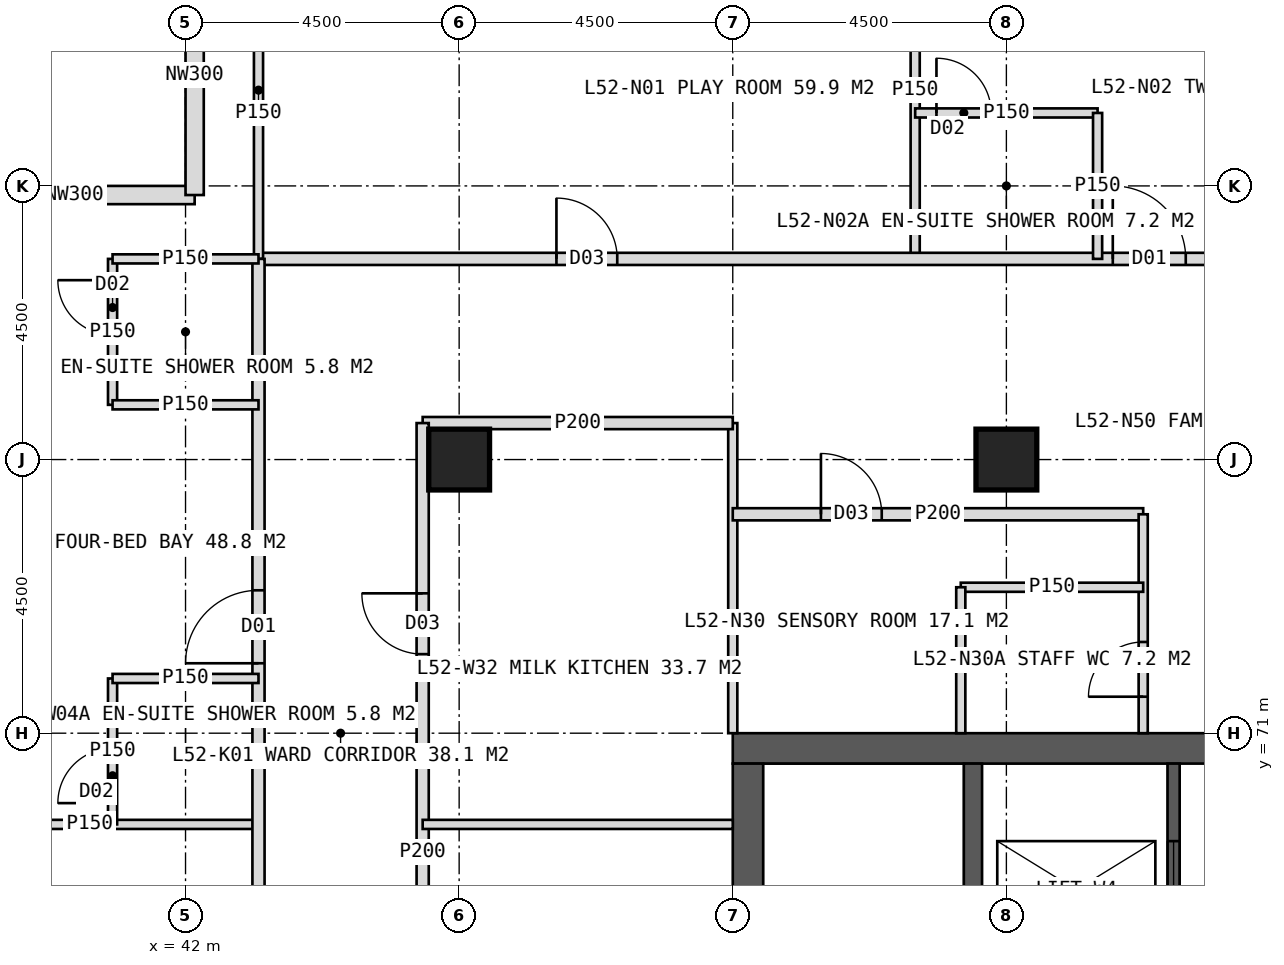
"""IFC4 building model, lengths in metres.
Left out: names, types, materials, properties, quantities, classifications, styles, units other than length and angle.
Written with IfcOpenShell. Run it as: python <this file> out.ifc"""

import sys

from ifc_helpers import new_model, si_unit, direction, frame, frame_2d, origin, origin_2d, place, context, subcontext, project, spatial, rectangle, hollow_rectangle, extrude, element, fill, save


model = new_model("IFC4")
c1 = context("Model", 3, precision=1e-05, world=origin(), true_north=direction((0.0, 1.0)))
c2 = subcontext(c1, "Body", "Model", "MODEL_VIEW")
j1 = project(units=[si_unit("LENGTHUNIT", "METRE"), si_unit("PLANEANGLEUNIT", "RADIAN")], contexts=[c1])
p1 = place(None, origin())
s1 = spatial("IfcSite", under=j1, at=p1, CompositionType="ELEMENT")
p2 = place(p1, origin())
s2 = spatial("IfcBuilding", under=s1, at=p2, CompositionType="ELEMENT")
p3 = place(p2, frame((0.0, 0.0, 217.0)))
s3 = spatial("IfcBuildingStorey", under=s2, at=p3, CompositionType="ELEMENT", Elevation=217.0)
p4 = place(p3, frame((51.0, 70.75, 0.0), z_axis=(0.0, 0.0, 1.0), x_axis=(1.0, 0.0, 0.0)))
e1 = element("IfcWall", 1, at=p4, inside=s3, PredefinedType="SHEAR", context=c2, shape_type="SweptSolid", body=[
    extrude(rectangle(XDim=18.0, YDim=0.5, at=frame_2d((9.0, 0.0))), origin(), (0.0, 0.0, 1.0), 4.0),
])
p5 = place(p4, frame((8.1, 0.0, 0.0)))
e2 = element("IfcOpeningElement", 2, at=p5, cuts=e1, PredefinedType="OPENING", context=c2, shape_type="SweptSolid", body=[
    extrude(rectangle(XDim=1.8, YDim=2.2, at=frame_2d((0.9, 1.1))), frame((0.0, 0.26, 0.0), z_axis=(0.0, -1.0, 0.0), x_axis=(1.0, 0.0, 0.0)), (0.0, 0.0, 1.0), 0.52),
])
p6 = place(p3, frame((51.25, 53.5, 0.0), z_axis=(0.0, 0.0, 1.0), x_axis=(0.0, 1.0, 0.0)))
e3 = element("IfcWall", 3, at=p6, inside=s3, PredefinedType="SHEAR", context=c2, shape_type="SweptSolid", body=[
    extrude(rectangle(XDim=17.0, YDim=0.5, at=frame_2d((8.5, 0.0))), origin(), (0.0, 0.0, 1.0), 4.0),
])
p7 = place(p6, frame((6.1, 0.0, 0.0)))
e4 = element("IfcOpeningElement", 4, at=p7, cuts=e3, PredefinedType="OPENING", context=c2, shape_type="SweptSolid", body=[
    extrude(rectangle(XDim=1.5, YDim=2.2, at=frame_2d((0.75, 1.1))), frame((0.0, 0.26, 0.0), z_axis=(0.0, -1.0, 0.0), x_axis=(1.0, 0.0, 0.0)), (0.0, 0.0, 1.0), 0.52),
])
p8 = place(p3, frame((54.95, 53.5, 0.0), z_axis=(0.0, 0.0, 1.0), x_axis=(0.0, 1.0, 0.0)))
e5 = element("IfcWall", 5, at=p8, inside=s3, PredefinedType="SHEAR", context=c2, shape_type="SweptSolid", body=[
    extrude(rectangle(XDim=17.0, YDim=0.3, at=frame_2d((8.5, 0.0))), origin(), (0.0, 0.0, 1.0), 4.0),
])
p9 = place(p3, frame((58.25, 53.5, 0.0), z_axis=(0.0, 0.0, 1.0), x_axis=(0.0, 1.0, 0.0)))
e6 = element("IfcWall", 6, at=p9, inside=s3, PredefinedType="SHEAR", context=c2, shape_type="SweptSolid", body=[
    extrude(rectangle(XDim=17.0, YDim=0.2, at=frame_2d((8.5, 0.0))), origin(), (0.0, 0.0, 1.0), 4.0),
])
p10 = place(p9, frame((0.393, 0.0, 0.0)))
e7 = element("IfcOpeningElement", 7, at=p10, cuts=e6, PredefinedType="OPENING", context=c2, shape_type="SweptSolid", body=[
    extrude(rectangle(XDim=1.0, YDim=2.1, at=frame_2d((0.5, 1.05))), frame((0.0, 0.11, 0.0), z_axis=(0.0, -1.0, 0.0), x_axis=(1.0, 0.0, 0.0)), (0.0, 0.0, 1.0), 0.22),
])
p11 = place(p9, frame((2.542, 0.0, 0.0)))
e8 = element("IfcOpeningElement", 8, at=p11, cuts=e6, PredefinedType="OPENING", context=c2, shape_type="SweptSolid", body=[
    extrude(rectangle(XDim=1.0, YDim=2.1, at=frame_2d((0.5, 1.05))), frame((0.0, 0.11, 0.0), z_axis=(0.0, -1.0, 0.0), x_axis=(1.0, 0.0, 0.0)), (0.0, 0.0, 1.0), 0.22),
])
p12 = place(p9, frame((5.127, 0.0, 0.0)))
e9 = element("IfcOpeningElement", 9, at=p12, cuts=e6, PredefinedType="OPENING", context=c2, shape_type="SweptSolid", body=[
    extrude(rectangle(XDim=1.0, YDim=2.1, at=frame_2d((0.5, 1.05))), frame((0.0, 0.11, 0.0), z_axis=(0.0, -1.0, 0.0), x_axis=(1.0, 0.0, 0.0)), (0.0, 0.0, 1.0), 0.22),
])
p13 = place(p9, frame((7.228, 0.0, 0.0)))
e10 = element("IfcOpeningElement", 10, at=p13, cuts=e6, PredefinedType="OPENING", context=c2, shape_type="SweptSolid", body=[
    extrude(rectangle(XDim=1.0, YDim=2.1, at=frame_2d((0.5, 1.05))), frame((0.0, 0.11, 0.0), z_axis=(0.0, -1.0, 0.0), x_axis=(1.0, 0.0, 0.0)), (0.0, 0.0, 1.0), 0.22),
])
p14 = place(p9, frame((10.025, 0.0, 0.0)))
e11 = element("IfcOpeningElement", 11, at=p14, cuts=e6, PredefinedType="OPENING", context=c2, shape_type="SweptSolid", body=[
    extrude(rectangle(XDim=1.4, YDim=2.2, at=frame_2d((0.7, 1.1))), frame((0.0, 0.11, 0.0), z_axis=(0.0, -1.0, 0.0), x_axis=(1.0, 0.0, 0.0)), (0.0, 0.0, 1.0), 0.22),
])
p15 = place(p9, frame((14.325, 0.0, 0.0)))
e12 = element("IfcOpeningElement", 12, at=p15, cuts=e6, PredefinedType="OPENING", context=c2, shape_type="SweptSolid", body=[
    extrude(rectangle(XDim=1.4, YDim=2.2, at=frame_2d((0.7, 1.1))), frame((0.0, 0.11, 0.0), z_axis=(0.0, -1.0, 0.0), x_axis=(1.0, 0.0, 0.0)), (0.0, 0.0, 1.0), 0.22),
])
for number, where, z_axis, x_axis in (
    (13, (46.5, 75.5, 0.0), (0.0, 0.0, 1.0), (1.0, 0.0, 0.0)),
    (14, (55.5, 75.5, 0.0), (0.0, 0.0, 1.0), (1.0, 0.0, 0.0)),
):
    element("IfcColumn", number, at=place(p3, frame(where, z_axis=z_axis, x_axis=x_axis)), inside=s3, PredefinedType="COLUMN", context=c2, shape_type="SweptSolid", body=[
        extrude(hollow_rectangle(XDim=1.0, YDim=1.0, WallThickness=0.1, at=origin_2d()), origin(), (0.0, 0.0, 1.0), 4.0),
    ])
for number, where, z_axis, x_axis in (
    (15, (38.2, 79.85, 0.0), (0.0, 0.0, 1.0), (1.0, 0.0, 0.0)),
    (16, (42.15, 79.85, 0.0), (0.0, 0.0, 1.0), (0.0, 1.0, 0.0)),
):
    element("IfcWall", number, at=place(p3, frame(where, z_axis=z_axis, x_axis=x_axis)), inside=s3, PredefinedType="ELEMENTEDWALL", context=c2, shape_type="SweptSolid", body=[
        extrude(rectangle(XDim=3.95, YDim=0.3, at=frame_2d((1.975, 0.0))), origin(), (0.0, 0.0, 1.0), 2.85),
    ])
p16 = place(p3, frame((54.0, 78.8, 0.0), z_axis=(0.0, 0.0, 1.0), x_axis=(0.0, 1.0, 0.0)))
e17 = element("IfcWall", 17, at=p16, inside=s3, PredefinedType="PARTITIONING", context=c2, shape_type="SweptSolid", body=[
    extrude(rectangle(XDim=5.55, YDim=0.15, at=frame_2d((2.775, 0.0))), origin(), (0.0, 0.0, 1.0), 3.75),
])
p17 = place(p3, frame((43.2, 78.8, 0.0), z_axis=(0.0, 0.0, 1.0), x_axis=(1.0, 0.0, 0.0)))
e18 = element("IfcWall", 18, at=p17, inside=s3, PredefinedType="PARTITIONING", context=c2, shape_type="SweptSolid", body=[
    extrude(rectangle(XDim=33.6, YDim=0.2, at=frame_2d((16.8, 0.0))), origin(), (0.0, 0.0, 1.0), 3.75),
])
p18 = place(p17, frame((4.9, 0.0, 0.0)))
e19 = element("IfcOpeningElement", 19, at=p18, cuts=e18, PredefinedType="OPENING", context=c2, shape_type="SweptSolid", body=[
    extrude(rectangle(XDim=1.0, YDim=2.1, at=frame_2d((0.5, 1.05))), frame((0.0, 0.11, 0.0), z_axis=(0.0, -1.0, 0.0), x_axis=(1.0, 0.0, 0.0)), (0.0, 0.0, 1.0), 0.22),
])
p19 = place(p17, frame((14.05, 0.0, 0.0)))
e20 = element("IfcOpeningElement", 20, at=p19, cuts=e18, PredefinedType="OPENING", context=c2, shape_type="SweptSolid", body=[
    extrude(rectangle(XDim=1.2, YDim=2.2, at=frame_2d((0.6, 1.1))), frame((0.0, 0.11, 0.0), z_axis=(0.0, -1.0, 0.0), x_axis=(1.0, 0.0, 0.0)), (0.0, 0.0, 1.0), 0.22),
])
p20 = place(p17, frame((22.45, 0.0, 0.0)))
e21 = element("IfcOpeningElement", 21, at=p20, cuts=e18, PredefinedType="OPENING", context=c2, shape_type="SweptSolid", body=[
    extrude(rectangle(XDim=1.2, YDim=2.2, at=frame_2d((0.6, 1.1))), frame((0.0, 0.11, 0.0), z_axis=(0.0, -1.0, 0.0), x_axis=(1.0, 0.0, 0.0)), (0.0, 0.0, 1.0), 0.22),
])
p21 = place(p3, frame((43.2, 78.8, 0.0), z_axis=(0.0, 0.0, 1.0), x_axis=(0.0, 1.0, 0.0)))
e22 = element("IfcWall", 22, at=p21, inside=s3, PredefinedType="PARTITIONING", context=c2, shape_type="SweptSolid", body=[
    extrude(rectangle(XDim=5.55, YDim=0.15, at=frame_2d((2.775, 0.0))), origin(), (0.0, 0.0, 1.0), 3.75),
])
p22 = place(p3, frame((54.0, 81.2, 0.0), z_axis=(0.0, 0.0, 1.0), x_axis=(1.0, 0.0, 0.0)))
e23 = element("IfcWall", 23, at=p22, inside=s3, PredefinedType="PARTITIONING", context=c2, shape_type="SweptSolid", body=[
    extrude(rectangle(XDim=3.0, YDim=0.15, at=frame_2d((1.5, 0.0))), origin(), (0.0, 0.0, 1.0), 3.75),
])
p23 = place(p22, frame((0.35, 0.0, 0.0)))
e24 = element("IfcOpeningElement", 24, at=p23, cuts=e23, PredefinedType="OPENING", context=c2, shape_type="SweptSolid", body=[
    extrude(rectangle(XDim=0.9, YDim=2.1, at=frame_2d((0.45, 1.05))), frame((0.0, 0.085, 0.0), z_axis=(0.0, -1.0, 0.0), x_axis=(1.0, 0.0, 0.0)), (0.0, 0.0, 1.0), 0.17),
])
p24 = place(p3, frame((57.0, 78.8, 0.0), z_axis=(0.0, 0.0, 1.0), x_axis=(0.0, 1.0, 0.0)))
e25 = element("IfcWall", 25, at=p24, inside=s3, PredefinedType="PARTITIONING", context=c2, shape_type="SweptSolid", body=[
    extrude(rectangle(XDim=2.4, YDim=0.15, at=frame_2d((1.2, 0.0))), origin(), (0.0, 0.0, 1.0), 3.75),
])
p25 = place(p3, frame((51.0, 71.0, 0.0), z_axis=(0.0, 0.0, 1.0), x_axis=(0.0, 1.0, 0.0)))
e26 = element("IfcWall", 26, at=p25, inside=s3, PredefinedType="PARTITIONING", context=c2, shape_type="SweptSolid", body=[
    extrude(rectangle(XDim=5.1, YDim=0.15, at=frame_2d((2.55, 0.0))), origin(), (0.0, 0.0, 1.0), 3.75),
])
p26 = place(p3, frame((45.9, 76.1, 0.0), z_axis=(0.0, 0.0, 1.0), x_axis=(1.0, 0.0, 0.0)))
e27 = element("IfcWall", 27, at=p26, inside=s3, PredefinedType="PARTITIONING", context=c2, shape_type="SweptSolid", body=[
    extrude(rectangle(XDim=5.1, YDim=0.2, at=frame_2d((2.55, 0.0))), origin(), (0.0, 0.0, 1.0), 3.75),
])
p27 = place(p3, frame((51.0, 74.6, 0.0), z_axis=(0.0, 0.0, 1.0), x_axis=(1.0, 0.0, 0.0)))
e28 = element("IfcWall", 28, at=p27, inside=s3, PredefinedType="PARTITIONING", context=c2, shape_type="SweptSolid", body=[
    extrude(rectangle(XDim=6.75, YDim=0.2, at=frame_2d((3.375, 0.0))), origin(), (0.0, 0.0, 1.0), 3.75),
])
p28 = place(p27, frame((1.45, 0.0, 0.0)))
e29 = element("IfcOpeningElement", 29, at=p28, cuts=e28, PredefinedType="OPENING", context=c2, shape_type="SweptSolid", body=[
    extrude(rectangle(XDim=1.0, YDim=2.1, at=frame_2d((0.5, 1.05))), frame((0.0, 0.11, 0.0), z_axis=(0.0, -1.0, 0.0), x_axis=(1.0, 0.0, 0.0)), (0.0, 0.0, 1.0), 0.22),
])
p29 = place(p3, frame((57.75, 71.0, 0.0), z_axis=(0.0, 0.0, 1.0), x_axis=(0.0, 1.0, 0.0)))
e30 = element("IfcWall", 30, at=p29, inside=s3, PredefinedType="PARTITIONING", context=c2, shape_type="SweptSolid", body=[
    extrude(rectangle(XDim=3.6, YDim=0.15, at=frame_2d((1.8, 0.0))), origin(), (0.0, 0.0, 1.0), 3.75),
])
p30 = place(p29, frame((0.6, 0.0, 0.0)))
e31 = element("IfcOpeningElement", 31, at=p30, cuts=e30, PredefinedType="OPENING", context=c2, shape_type="SweptSolid", body=[
    extrude(rectangle(XDim=0.9, YDim=2.1, at=frame_2d((0.45, 1.05))), frame((0.0, 0.085, 0.0), z_axis=(0.0, -1.0, 0.0), x_axis=(1.0, 0.0, 0.0)), (0.0, 0.0, 1.0), 0.17),
])
p31 = place(p3, frame((54.75, 73.4, 0.0), z_axis=(0.0, 0.0, 1.0), x_axis=(1.0, 0.0, 0.0)))
e32 = element("IfcWall", 32, at=p31, inside=s3, PredefinedType="PARTITIONING", context=c2, shape_type="SweptSolid", body=[
    extrude(rectangle(XDim=3.0, YDim=0.15, at=frame_2d((1.5, 0.0))), origin(), (0.0, 0.0, 1.0), 3.75),
])
p32 = place(p3, frame((54.75, 71.0, 0.0), z_axis=(0.0, 0.0, 1.0), x_axis=(0.0, 1.0, 0.0)))
e33 = element("IfcWall", 33, at=p32, inside=s3, PredefinedType="PARTITIONING", context=c2, shape_type="SweptSolid", body=[
    extrude(rectangle(XDim=2.4, YDim=0.15, at=frame_2d((1.2, 0.0))), origin(), (0.0, 0.0, 1.0), 3.75),
])
p33 = place(p3, frame((43.2, 69.5, 0.0), z_axis=(0.0, 0.0, 1.0), x_axis=(-1.0, 0.0, 0.0)))
e34 = element("IfcWall", 34, at=p33, inside=s3, PredefinedType="PARTITIONING", context=c2, shape_type="SweptSolid", body=[
    extrude(rectangle(XDim=5.55, YDim=0.15, at=frame_2d((2.775, 0.0))), origin(), (0.0, 0.0, 1.0), 3.75),
])
p34 = place(p3, frame((43.2, 45.2, 0.0), z_axis=(0.0, 0.0, 1.0), x_axis=(0.0, 1.0, 0.0)))
e35 = element("IfcWall", 35, at=p34, inside=s3, PredefinedType="PARTITIONING", context=c2, shape_type="SweptSolid", body=[
    extrude(rectangle(XDim=33.6, YDim=0.2, at=frame_2d((16.8, 0.0))), origin(), (0.0, 0.0, 1.0), 3.75),
])
p35 = place(p34, frame((3.25, 0.0, 0.0)))
e36 = element("IfcOpeningElement", 36, at=p35, cuts=e35, PredefinedType="OPENING", context=c2, shape_type="SweptSolid", body=[
    extrude(rectangle(XDim=1.2, YDim=2.2, at=frame_2d((0.6, 1.1))), frame((0.0, 0.11, 0.0), z_axis=(0.0, -1.0, 0.0), x_axis=(1.0, 0.0, 0.0)), (0.0, 0.0, 1.0), 0.22),
])
p36 = place(p34, frame((11.05, 0.0, 0.0)))
e37 = element("IfcOpeningElement", 37, at=p36, cuts=e35, PredefinedType="OPENING", context=c2, shape_type="SweptSolid", body=[
    extrude(rectangle(XDim=1.2, YDim=2.2, at=frame_2d((0.6, 1.1))), frame((0.0, 0.11, 0.0), z_axis=(0.0, -1.0, 0.0), x_axis=(1.0, 0.0, 0.0)), (0.0, 0.0, 1.0), 0.22),
])
p37 = place(p34, frame((20.05, 0.0, 0.0)))
e38 = element("IfcOpeningElement", 38, at=p37, cuts=e35, PredefinedType="OPENING", context=c2, shape_type="SweptSolid", body=[
    extrude(rectangle(XDim=1.2, YDim=2.2, at=frame_2d((0.6, 1.1))), frame((0.0, 0.11, 0.0), z_axis=(0.0, -1.0, 0.0), x_axis=(1.0, 0.0, 0.0)), (0.0, 0.0, 1.0), 0.22),
])
p38 = place(p34, frame((26.95, 0.0, 0.0)))
e39 = element("IfcOpeningElement", 39, at=p38, cuts=e35, PredefinedType="OPENING", context=c2, shape_type="SweptSolid", body=[
    extrude(rectangle(XDim=1.2, YDim=2.2, at=frame_2d((0.6, 1.1))), frame((0.0, 0.11, 0.0), z_axis=(0.0, -1.0, 0.0), x_axis=(1.0, 0.0, 0.0)), (0.0, 0.0, 1.0), 0.22),
])
p39 = place(p3, frame((40.8, 69.5, 0.0), z_axis=(0.0, 0.0, 1.0), x_axis=(0.0, 1.0, 0.0)))
e40 = element("IfcWall", 40, at=p39, inside=s3, PredefinedType="PARTITIONING", context=c2, shape_type="SweptSolid", body=[
    extrude(rectangle(XDim=2.4, YDim=0.15, at=frame_2d((1.2, 0.0))), origin(), (0.0, 0.0, 1.0), 3.75),
])
p40 = place(p39, frame((0.35, 0.0, 0.0)))
e41 = element("IfcOpeningElement", 41, at=p40, cuts=e40, PredefinedType="OPENING", context=c2, shape_type="SweptSolid", body=[
    extrude(rectangle(XDim=0.9, YDim=2.1, at=frame_2d((0.45, 1.05))), frame((0.0, 0.085, 0.0), z_axis=(0.0, -1.0, 0.0), x_axis=(1.0, 0.0, 0.0)), (0.0, 0.0, 1.0), 0.17),
])
p41 = place(p3, frame((43.2, 71.9, 0.0), z_axis=(0.0, 0.0, 1.0), x_axis=(-1.0, 0.0, 0.0)))
e42 = element("IfcWall", 42, at=p41, inside=s3, PredefinedType="PARTITIONING", context=c2, shape_type="SweptSolid", body=[
    extrude(rectangle(XDim=2.4, YDim=0.15, at=frame_2d((1.2, 0.0))), origin(), (0.0, 0.0, 1.0), 3.75),
])
p42 = place(p3, frame((40.8, 76.4, 0.0), z_axis=(0.0, 0.0, 1.0), x_axis=(0.0, 1.0, 0.0)))
e43 = element("IfcWall", 43, at=p42, inside=s3, PredefinedType="PARTITIONING", context=c2, shape_type="SweptSolid", body=[
    extrude(rectangle(XDim=2.4, YDim=0.15, at=frame_2d((1.2, 0.0))), origin(), (0.0, 0.0, 1.0), 3.75),
])
p43 = place(p42, frame((1.15, 0.0, 0.0)))
e44 = element("IfcOpeningElement", 44, at=p43, cuts=e43, PredefinedType="OPENING", context=c2, shape_type="SweptSolid", body=[
    extrude(rectangle(XDim=0.9, YDim=2.1, at=frame_2d((0.45, 1.05))), frame((0.0, 0.085, 0.0), z_axis=(0.0, -1.0, 0.0), x_axis=(1.0, 0.0, 0.0)), (0.0, 0.0, 1.0), 0.17),
])
for number, where, z_axis, x_axis in (
    (45, (43.2, 76.4, 0.0), (0.0, 0.0, 1.0), (-1.0, 0.0, 0.0)),
    (46, (43.2, 78.8, 0.0), (0.0, 0.0, 1.0), (-1.0, 0.0, 0.0)),
):
    element("IfcWall", number, at=place(p3, frame(where, z_axis=z_axis, x_axis=x_axis)), inside=s3, PredefinedType="PARTITIONING", context=c2, shape_type="SweptSolid", body=[
        extrude(rectangle(XDim=2.4, YDim=0.15, at=frame_2d((1.2, 0.0))), origin(), (0.0, 0.0, 1.0), 3.75),
    ])
p44 = place(p3, frame((45.9, 62.0, 0.0), z_axis=(0.0, 0.0, 1.0), x_axis=(0.0, 1.0, 0.0)))
e47 = element("IfcWall", 47, at=p44, inside=s3, PredefinedType="PARTITIONING", context=c2, shape_type="SweptSolid", body=[
    extrude(rectangle(XDim=14.1, YDim=0.2, at=frame_2d((7.05, 0.0))), origin(), (0.0, 0.0, 1.0), 3.75),
])
p45 = place(p44, frame((1.45, 0.0, 0.0)))
e48 = element("IfcOpeningElement", 48, at=p45, cuts=e47, PredefinedType="OPENING", context=c2, shape_type="SweptSolid", body=[
    extrude(rectangle(XDim=1.0, YDim=2.1, at=frame_2d((0.5, 1.05))), frame((0.0, 0.11, 0.0), z_axis=(0.0, -1.0, 0.0), x_axis=(1.0, 0.0, 0.0)), (0.0, 0.0, 1.0), 0.22),
])
p46 = place(p44, frame((10.3, 0.0, 0.0)))
e49 = element("IfcOpeningElement", 49, at=p46, cuts=e47, PredefinedType="OPENING", context=c2, shape_type="SweptSolid", body=[
    extrude(rectangle(XDim=1.0, YDim=2.1, at=frame_2d((0.5, 1.05))), frame((0.0, 0.11, 0.0), z_axis=(0.0, -1.0, 0.0), x_axis=(1.0, 0.0, 0.0)), (0.0, 0.0, 1.0), 0.22),
])
p47 = place(p3, frame((51.0, 69.5, 0.0), z_axis=(0.0, 0.0, 1.0), x_axis=(-1.0, 0.0, 0.0)))
e50 = element("IfcWall", 50, at=p47, inside=s3, PredefinedType="PARTITIONING", context=c2, shape_type="SweptSolid", body=[
    extrude(rectangle(XDim=5.1, YDim=0.15, at=frame_2d((2.55, 0.0))), origin(), (0.0, 0.0, 1.0), 3.75),
])
p48 = place(p18, origin())
e51 = element("IfcDoor", 51, at=p48, inside=s3, OperationType="SINGLE_SWING_LEFT", PredefinedType="DOOR", context=c2, shape_type="SweptSolid", body=[
    extrude(rectangle(XDim=1.0, YDim=2.1, at=frame_2d((0.5, 1.05))), frame((0.0, 0.025, 0.0), z_axis=(0.0, -1.0, 0.0), x_axis=(1.0, 0.0, 0.0)), (0.0, 0.0, 1.0), 0.05),
])
fill(e19, e51)
p49 = place(p19, origin())
e52 = element("IfcDoor", 52, at=p49, inside=s3, OperationType="SINGLE_SWING_LEFT", PredefinedType="DOOR", context=c2, shape_type="SweptSolid", body=[
    extrude(rectangle(XDim=1.2, YDim=2.2, at=frame_2d((0.6, 1.1))), frame((0.0, 0.025, 0.0), z_axis=(0.0, -1.0, 0.0), x_axis=(1.0, 0.0, 0.0)), (0.0, 0.0, 1.0), 0.05),
])
fill(e20, e52)
p50 = place(p23, origin())
e53 = element("IfcDoor", 53, at=p50, inside=s3, OperationType="SINGLE_SWING_LEFT", PredefinedType="DOOR", context=c2, shape_type="SweptSolid", body=[
    extrude(rectangle(XDim=0.9, YDim=2.1, at=frame_2d((0.45, 1.05))), frame((0.0, 0.025, 0.0), z_axis=(0.0, -1.0, 0.0), x_axis=(1.0, 0.0, 0.0)), (0.0, 0.0, 1.0), 0.05),
])
fill(e24, e53)
p51 = place(p30, origin())
e54 = element("IfcDoor", 54, at=p51, inside=s3, OperationType="SINGLE_SWING_LEFT", PredefinedType="DOOR", context=c2, shape_type="SweptSolid", body=[
    extrude(rectangle(XDim=0.9, YDim=2.1, at=frame_2d((0.45, 1.05))), frame((0.0, 0.025, 0.0), z_axis=(0.0, -1.0, 0.0), x_axis=(1.0, 0.0, 0.0)), (0.0, 0.0, 1.0), 0.05),
])
fill(e31, e54)
p52 = place(p28, origin())
e55 = element("IfcDoor", 55, at=p52, inside=s3, OperationType="SINGLE_SWING_LEFT", PredefinedType="DOOR", context=c2, shape_type="SweptSolid", body=[
    extrude(rectangle(XDim=1.0, YDim=2.1, at=frame_2d((0.5, 1.05))), frame((0.0, 0.025, 0.0), z_axis=(0.0, -1.0, 0.0), x_axis=(1.0, 0.0, 0.0)), (0.0, 0.0, 1.0), 0.05),
])
fill(e29, e55)
p53 = place(p38, origin())
e56 = element("IfcDoor", 56, at=p53, inside=s3, OperationType="SINGLE_SWING_LEFT", PredefinedType="DOOR", context=c2, shape_type="SweptSolid", body=[
    extrude(rectangle(XDim=1.2, YDim=2.2, at=frame_2d((0.6, 1.1))), frame((0.0, 0.025, 0.0), z_axis=(0.0, -1.0, 0.0), x_axis=(1.0, 0.0, 0.0)), (0.0, 0.0, 1.0), 0.05),
])
fill(e39, e56)
p54 = place(p40, origin())
e57 = element("IfcDoor", 57, at=p54, inside=s3, OperationType="SINGLE_SWING_LEFT", PredefinedType="DOOR", context=c2, shape_type="SweptSolid", body=[
    extrude(rectangle(XDim=0.9, YDim=2.1, at=frame_2d((0.45, 1.05))), frame((0.0, 0.025, 0.0), z_axis=(0.0, -1.0, 0.0), x_axis=(1.0, 0.0, 0.0)), (0.0, 0.0, 1.0), 0.05),
])
fill(e41, e57)
p55 = place(p43, origin())
e58 = element("IfcDoor", 58, at=p55, inside=s3, OperationType="SINGLE_SWING_RIGHT", PredefinedType="DOOR", context=c2, shape_type="SweptSolid", body=[
    extrude(rectangle(XDim=0.9, YDim=2.1, at=frame_2d((0.45, 1.05))), frame((0.0, 0.025, 0.0), z_axis=(0.0, -1.0, 0.0), x_axis=(1.0, 0.0, 0.0)), (0.0, 0.0, 1.0), 0.05),
])
fill(e44, e58)
p56 = place(p46, origin())
e59 = element("IfcDoor", 59, at=p56, inside=s3, OperationType="SINGLE_SWING_RIGHT", PredefinedType="DOOR", context=c2, shape_type="SweptSolid", body=[
    extrude(rectangle(XDim=1.0, YDim=2.1, at=frame_2d((0.5, 1.05))), frame((0.0, 0.025, 0.0), z_axis=(0.0, -1.0, 0.0), x_axis=(1.0, 0.0, 0.0)), (0.0, 0.0, 1.0), 0.05),
])
fill(e49, e59)
p57 = place(p15, origin())
e60 = element("IfcDoor", 60, at=p57, inside=s3, OperationType="SLIDING_TO_LEFT", PredefinedType="DOOR", context=c2, shape_type="SweptSolid", body=[
    extrude(rectangle(XDim=1.4, YDim=2.2, at=frame_2d((0.7, 1.1))), frame((0.0, 0.025, 0.0), z_axis=(0.0, -1.0, 0.0), x_axis=(1.0, 0.0, 0.0)), (0.0, 0.0, 1.0), 0.05),
])
fill(e12, e60)
save(model, sys.argv[1])
